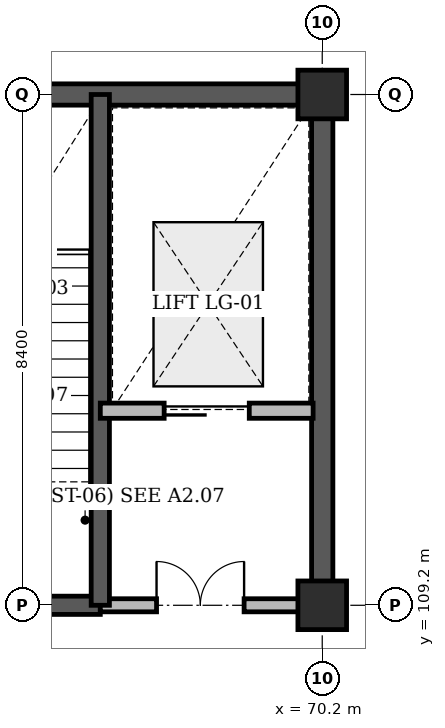
"""IFC4 building model, lengths in metres.
Left out: names, types, materials, properties, quantities, classifications, styles, units other than length and angle.
Written with IfcOpenShell. Run it as: python <this file> out.ifc"""

import sys

from ifc_helpers import new_model, si_unit, direction, frame, frame_2d, origin, origin_2d, place, context, subcontext, project, spatial, rectangle, extrude, element, fill, save


model = new_model("IFC4")
c1 = context("Model", 3, precision=1e-05, world=origin(), true_north=direction((0.0, 1.0)))
c2 = subcontext(c1, "Body", "Model", "MODEL_VIEW")
j1 = project(units=[si_unit("LENGTHUNIT", "METRE"), si_unit("PLANEANGLEUNIT", "RADIAN")], contexts=[c1])
p1 = place(None, origin())
s1 = spatial("IfcSite", under=j1, at=p1, CompositionType="ELEMENT")
p2 = place(p1, origin())
s2 = spatial("IfcBuilding", under=s1, at=p2, CompositionType="ELEMENT")
p3 = place(p2, origin())
s3 = spatial("IfcBuildingStorey", under=s2, at=p3, CompositionType="ELEMENT", Elevation=0.0)
p4 = place(p3, frame((62.225, 117.6, 0.0), z_axis=(0.0, 0.0, 1.0), x_axis=(1.0, 0.0, 0.0)))
e1 = element("IfcWall", 1, at=p4, inside=s3, PredefinedType="SHEAR", context=c2, shape_type="SweptSolid", body=[
    extrude(rectangle(XDim=8.15, YDim=0.35, at=frame_2d((4.075, 0.0))), origin(), (0.0, 0.0, 1.0), 4.48),
])
p5 = place(p3, frame((70.2, 109.2, 0.0), z_axis=(0.0, 0.0, 1.0), x_axis=(0.0, 1.0, 0.0)))
e2 = element("IfcWall", 2, at=p5, inside=s3, PredefinedType="SHEAR", context=c2, shape_type="SweptSolid", body=[
    extrude(rectangle(XDim=8.4, YDim=0.35, at=frame_2d((4.2, 0.0))), origin(), (0.0, 0.0, 1.0), 4.48),
])
for number, where, z_axis, x_axis in (
    (3, (70.2, 109.2, 0.0), (0.0, 0.0, 1.0), (1.0, 0.0, 0.0)),
    (4, (70.2, 117.6, 0.0), (0.0, 0.0, 1.0), (1.0, 0.0, 0.0)),
):
    element("IfcColumn", number, at=place(p3, frame(where, z_axis=z_axis, x_axis=x_axis)), inside=s3, PredefinedType="COLUMN", context=c2, shape_type="SweptSolid", body=[
        extrude(rectangle(XDim=0.8, YDim=0.8, at=origin_2d()), origin(), (0.0, 0.0, 1.0), 4.8),
    ])
p6 = place(p3, frame((62.4, 109.2, 0.0), z_axis=(0.0, 0.0, 1.0), x_axis=(1.0, 0.0, 0.0)))
e5 = element("IfcWall", 5, at=p6, inside=s3, PredefinedType="SHEAR", context=c2, shape_type="SweptSolid", body=[
    extrude(rectangle(XDim=4.15, YDim=0.3, at=frame_2d((2.075, 0.0))), origin(), (0.0, 0.0, 1.0), 4.8),
])
p7 = place(p6, frame((1.335, 0.0, 0.0)))
e6 = element("IfcOpeningElement", 6, at=p7, cuts=e5, PredefinedType="OPENING", context=c2, shape_type="SweptSolid", body=[
    extrude(rectangle(XDim=1.48, YDim=2.2, at=frame_2d((0.74, 1.1))), frame((0.0, 0.16, 0.0), z_axis=(0.0, -1.0, 0.0), x_axis=(1.0, 0.0, 0.0)), (0.0, 0.0, 1.0), 0.32),
])
p8 = place(p3, frame((66.55, 109.2, 0.0), z_axis=(0.0, 0.0, 1.0), x_axis=(1.0, 0.0, 0.0)))
e7 = element("IfcWall", 7, at=p8, inside=s3, PredefinedType="STANDARD", context=c2, shape_type="SweptSolid", body=[
    extrude(rectangle(XDim=3.29, YDim=0.215, at=frame_2d((1.645, 0.0))), origin(), (0.0, 0.0, 1.0), 3.63),
])
p9 = place(p8, frame((0.925, 0.0, 0.0)))
e8 = element("IfcOpeningElement", 8, at=p9, cuts=e7, PredefinedType="OPENING", context=c2, shape_type="SweptSolid", body=[
    extrude(rectangle(XDim=1.44, YDim=2.2, at=frame_2d((0.72, 1.1))), frame((0.0, 0.118, 0.0), z_axis=(0.0, -1.0, 0.0), x_axis=(1.0, 0.0, 0.0)), (0.0, 0.0, 1.0), 0.235),
])
p10 = place(p3, frame((66.55, 109.2, 0.0), z_axis=(0.0, 0.0, 1.0), x_axis=(0.0, 1.0, 0.0)))
e9 = element("IfcWall", 9, at=p10, inside=s3, PredefinedType="SHEAR", context=c2, shape_type="SweptSolid", body=[
    extrude(rectangle(XDim=8.4, YDim=0.3, at=frame_2d((4.2, 0.0))), origin(), (0.0, 0.0, 1.0), 4.8),
])
p11 = place(p3, frame((66.55, 112.4, 0.0), z_axis=(0.0, 0.0, 1.0), x_axis=(1.0, 0.0, 0.0)))
e10 = element("IfcWall", 10, at=p11, inside=s3, PredefinedType="STANDARD", context=c2, shape_type="SweptSolid", body=[
    extrude(rectangle(XDim=3.5, YDim=0.25, at=frame_2d((1.75, 0.0))), origin(), (0.0, 0.0, 1.0), 4.46),
])
p12 = place(p11, frame((1.05, 0.0, 0.0)))
e11 = element("IfcOpeningElement", 11, at=p12, cuts=e10, PredefinedType="OPENING", context=c2, shape_type="SweptSolid", body=[
    extrude(rectangle(XDim=1.4, YDim=2.2, at=frame_2d((0.7, 1.1))), frame((0.0, 0.135, 0.0), z_axis=(0.0, -1.0, 0.0), x_axis=(1.0, 0.0, 0.0)), (0.0, 0.0, 1.0), 0.27),
])
p13 = place(p9, origin())
e12 = element("IfcDoor", 12, at=p13, inside=s3, OperationType="DOUBLE_DOOR_SINGLE_SWING", PredefinedType="DOOR", context=c2, shape_type="SweptSolid", body=[
    extrude(rectangle(XDim=1.44, YDim=2.2, at=frame_2d((0.72, 1.1))), frame((0.0, 0.025, 0.0), z_axis=(0.0, -1.0, 0.0), x_axis=(1.0, 0.0, 0.0)), (0.0, 0.0, 1.0), 0.05),
])
fill(e8, e12)
p14 = place(p12, origin())
e13 = element("IfcDoor", 13, at=p14, inside=s3, OperationType="SLIDING_TO_LEFT", PredefinedType="DOOR", context=c2, shape_type="SweptSolid", body=[
    extrude(rectangle(XDim=1.4, YDim=2.2, at=frame_2d((0.7, 1.1))), frame((0.0, 0.025, 0.0), z_axis=(0.0, -1.0, 0.0), x_axis=(1.0, 0.0, 0.0)), (0.0, 0.0, 1.0), 0.05),
])
fill(e11, e13)
save(model, sys.argv[1])
